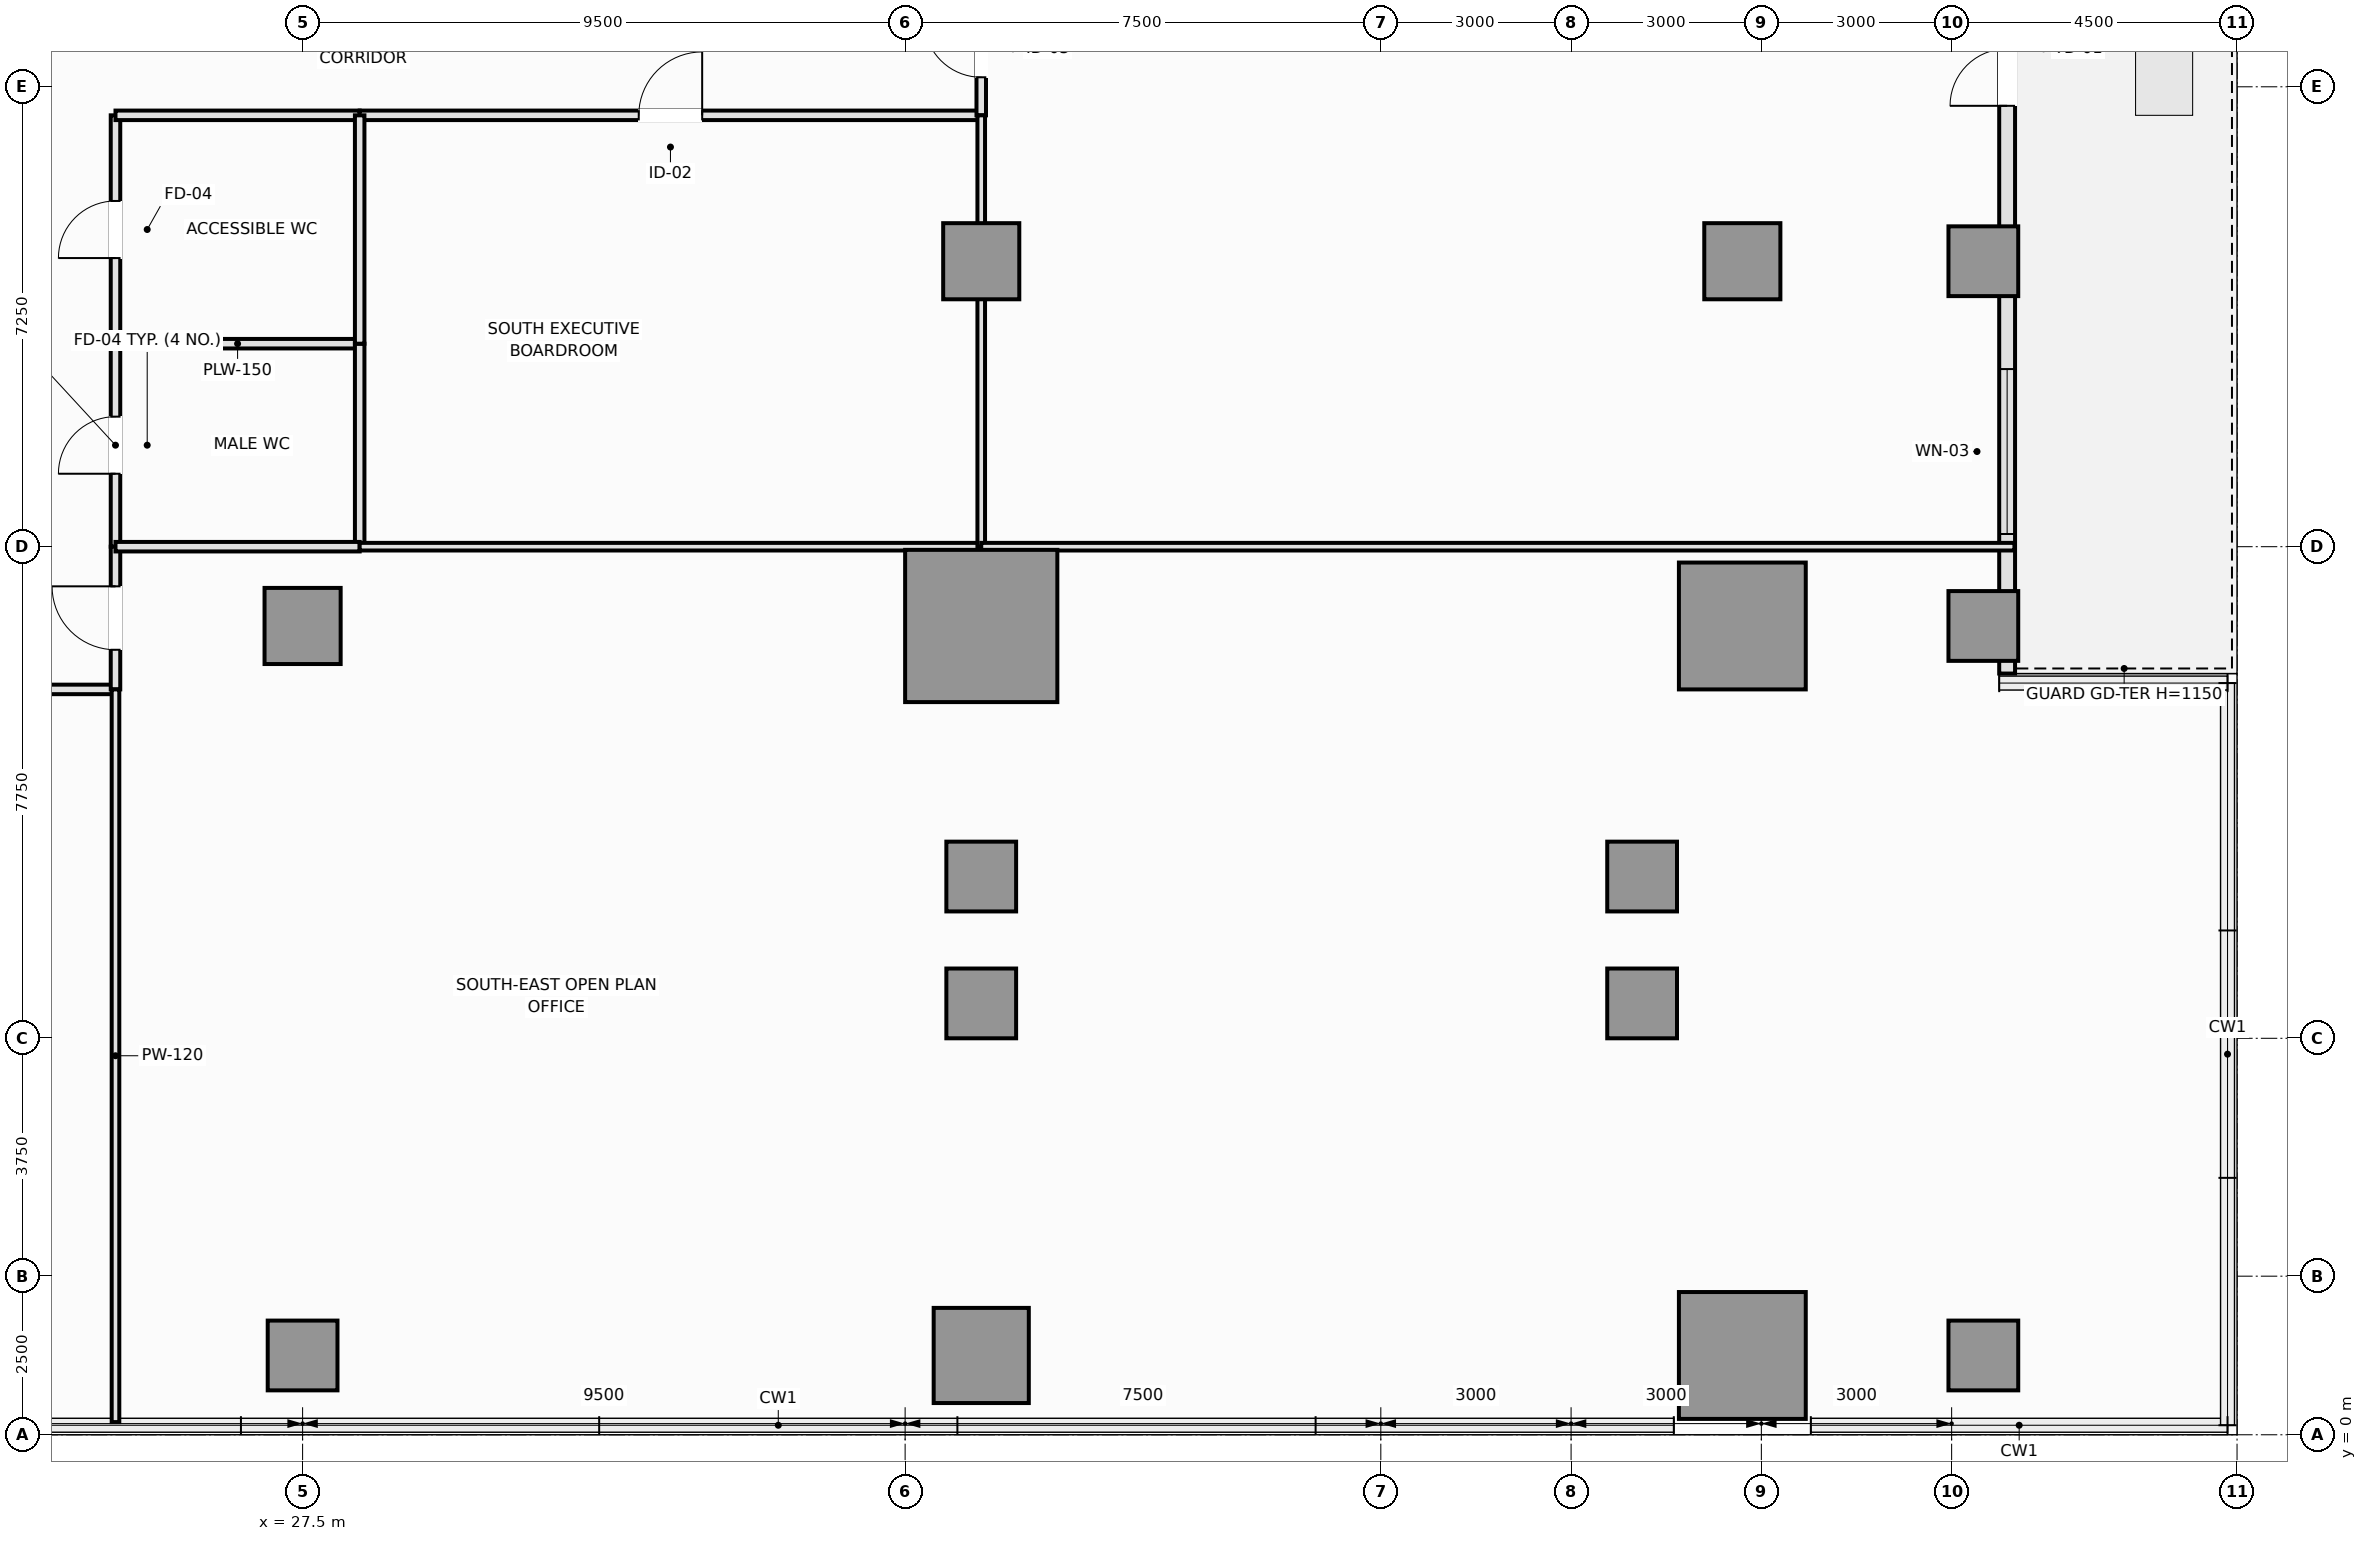
"""IFC4 building model, lengths in metres.
Left out: names, types, materials, properties, quantities, classifications, styles, units other than length and angle.
Written with IfcOpenShell. Run it as: python <this file> out.ifc"""

import sys

from ifc_helpers import new_model, si_unit, direction, frame, frame_2d, origin, origin_2d, place, context, subcontext, project, spatial, rectangle, extrude, element, fill, save


model = new_model("IFC4")
c1 = context("Model", 3, precision=1e-05, world=origin(), true_north=direction((0.0, 1.0)))
c2 = subcontext(c1, "Body", "Model", "MODEL_VIEW")
j1 = project(units=[si_unit("LENGTHUNIT", "METRE"), si_unit("PLANEANGLEUNIT", "RADIAN")], contexts=[c1])
p1 = place(None, origin())
s1 = spatial("IfcSite", under=j1, at=p1, CompositionType="ELEMENT")
p2 = place(p1, origin())
s2 = spatial("IfcBuilding", under=s1, at=p2, CompositionType="ELEMENT")
p3 = place(p2, frame((0.0, 0.0, 20.4)))
s3 = spatial("IfcBuildingStorey", under=s2, at=p3, CompositionType="ELEMENT", Elevation=20.4)
p4 = place(p3, frame((38.2, 12.75, 0.0), z_axis=(0.0, 0.0, 1.0), x_axis=(1.0, 0.0, 0.0)))
e1 = element("IfcColumn", 1, at=p4, inside=s3, PredefinedType="COLUMN", context=c2, shape_type="SweptSolid", body=[
    extrude(rectangle(XDim=2.4, YDim=2.4, at=origin_2d()), origin(), (0.0, 0.0, 1.0), 5.2),
])
for number, where, z_axis, x_axis in (
    (2, (27.5, 12.75, 0.0), (0.0, 0.0, 1.0), (1.0, 0.0, 0.0)),
    (3, (38.2, 18.5, 0.0), (0.0, 0.0, 1.0), (1.0, 0.0, 0.0)),
):
    element("IfcColumn", number, at=place(p3, frame(where, z_axis=z_axis, x_axis=x_axis)), inside=s3, PredefinedType="COLUMN", context=c2, shape_type="SweptSolid", body=[
        extrude(rectangle(XDim=1.2, YDim=1.2, at=origin_2d()), origin(), (0.0, 0.0, 1.0), 5.2),
    ])
for number, where, z_axis, x_axis in (
    (4, (50.2, 1.25, 0.0), (0.0, 0.0, 1.0), (1.0, 0.0, 0.0)),
    (5, (50.2, 12.75, 0.0), (0.0, 0.0, 1.0), (1.0, 0.0, 0.0)),
):
    element("IfcColumn", number, at=place(p3, frame(where, z_axis=z_axis, x_axis=x_axis)), inside=s3, PredefinedType="COLUMN", context=c2, shape_type="SweptSolid", body=[
        extrude(rectangle(XDim=2.0, YDim=2.0, at=origin_2d()), origin(), (0.0, 0.0, 1.0), 5.2),
    ])
p5 = place(p3, frame((50.2, 18.5, 0.0), z_axis=(0.0, 0.0, 1.0), x_axis=(1.0, 0.0, 0.0)))
e6 = element("IfcColumn", 6, at=p5, inside=s3, PredefinedType="COLUMN", context=c2, shape_type="SweptSolid", body=[
    extrude(rectangle(XDim=1.2, YDim=1.2, at=origin_2d()), origin(), (0.0, 0.0, 1.0), 5.2),
])
for number, where, z_axis, x_axis in (
    (7, (54.0, 1.25, 0.0), (0.0, 0.0, 1.0), (1.0, 0.0, 0.0)),
    (8, (54.0, 12.75, 0.0), (0.0, 0.0, 1.0), (1.0, 0.0, 0.0)),
    (9, (54.0, 18.5, 0.0), (0.0, 0.0, 1.0), (1.0, 0.0, 0.0)),
    (10, (48.62, 6.8, 0.0), (0.0, 0.0, 1.0), (1.0, 0.0, 0.0)),
    (11, (48.62, 8.8, 0.0), (0.0, 0.0, 1.0), (1.0, 0.0, 0.0)),
    (12, (38.2, 6.8, 0.0), (0.0, 0.0, 1.0), (1.0, 0.0, 0.0)),
    (13, (38.2, 8.8, 0.0), (0.0, 0.0, 1.0), (1.0, 0.0, 0.0)),
    (14, (27.5, 1.25, 0.0), (0.0, 0.0, 1.0), (1.0, 0.0, 0.0)),
):
    element("IfcColumn", number, at=place(p3, frame(where, z_axis=z_axis, x_axis=x_axis)), inside=s3, PredefinedType="COLUMN", context=c2, shape_type="SweptSolid", body=[
        extrude(rectangle(XDim=1.1, YDim=1.1, at=origin_2d()), origin(), (0.0, 0.0, 1.0), 5.2),
    ])
p6 = place(p3, frame((38.2, 1.25, 0.0), z_axis=(0.0, 0.0, 1.0), x_axis=(1.0, 0.0, 0.0)))
e15 = element("IfcColumn", 15, at=p6, inside=s3, PredefinedType="COLUMN", context=c2, shape_type="SweptSolid", body=[
    extrude(rectangle(XDim=1.5, YDim=1.5, at=origin_2d()), origin(), (0.0, 0.0, 1.0), 5.2),
])
p7 = place(p3, frame((54.375, 12.0, 0.0), z_axis=(0.0, 0.0, 1.0), x_axis=(0.0, 1.0, 0.0)))
e16 = element("IfcWall", 16, at=p7, inside=s3, PredefinedType="SOLIDWALL", context=c2, shape_type="SweptSolid", body=[
    extrude(rectangle(XDim=26.5, YDim=0.25, at=frame_2d((13.25, 0.0))), origin(), (0.0, 0.0, 1.0), 5.02),
])
p8 = place(p7, frame((8.95, 0.0, 0.0)))
e17 = element("IfcOpeningElement", 17, at=p8, cuts=e16, PredefinedType="OPENING", context=c2, shape_type="SweptSolid", body=[
    extrude(rectangle(XDim=1.8, YDim=2.2, at=frame_2d((0.9, 1.1))), frame((0.0, 0.135, 0.0), z_axis=(0.0, -1.0, 0.0), x_axis=(1.0, 0.0, 0.0)), (0.0, 0.0, 1.0), 0.27),
])
p9 = place(p7, frame((2.2, 0.0, 0.9)))
e18 = element("IfcOpeningElement", 18, at=p9, cuts=e16, PredefinedType="OPENING", context=c2, shape_type="SweptSolid", body=[
    extrude(rectangle(XDim=2.6, YDim=2.2, at=frame_2d((1.3, 1.1))), frame((0.0, 0.135, 0.0), z_axis=(0.0, -1.0, 0.0), x_axis=(1.0, 0.0, 0.0)), (0.0, 0.0, 1.0), 0.27),
])
p10 = place(p7, frame((21.8, 0.0, 0.9)))
e19 = element("IfcOpeningElement", 19, at=p10, cuts=e16, PredefinedType="OPENING", context=c2, shape_type="SweptSolid", body=[
    extrude(rectangle(XDim=2.6, YDim=2.2, at=frame_2d((1.3, 1.1))), frame((0.0, 0.135, 0.0), z_axis=(0.0, -1.0, 0.0), x_axis=(1.0, 0.0, 0.0)), (0.0, 0.0, 1.0), 0.27),
])
p11 = place(p3, frame((24.55, 14.0, 0.0), z_axis=(0.0, 0.0, 1.0), x_axis=(0.0, 1.0, 0.0)))
e20 = element("IfcWall", 20, at=p11, inside=s3, PredefinedType="PLUMBINGWALL", context=c2, shape_type="SweptSolid", body=[
    extrude(rectangle(XDim=3.2, YDim=0.15, at=frame_2d((1.6, 0.0))), origin(), (0.0, 0.0, 1.0), 5.02),
])
p12 = place(p11, frame((1.15, 0.0, 0.0)))
e21 = element("IfcOpeningElement", 21, at=p12, cuts=e20, PredefinedType="OPENING", context=c2, shape_type="SweptSolid", body=[
    extrude(rectangle(XDim=0.9, YDim=2.1, at=frame_2d((0.45, 1.05))), frame((0.0, 0.085, 0.0), z_axis=(0.0, -1.0, 0.0), x_axis=(1.0, 0.0, 0.0)), (0.0, 0.0, 1.0), 0.17),
])
p13 = place(p3, frame((24.55, 17.2, 0.0), z_axis=(0.0, 0.0, 1.0), x_axis=(0.0, 1.0, 0.0)))
e22 = element("IfcWall", 22, at=p13, inside=s3, PredefinedType="PLUMBINGWALL", context=c2, shape_type="SweptSolid", body=[
    extrude(rectangle(XDim=3.6, YDim=0.15, at=frame_2d((1.8, 0.0))), origin(), (0.0, 0.0, 1.0), 5.02),
])
p14 = place(p13, frame((1.35, 0.0, 0.0)))
e23 = element("IfcOpeningElement", 23, at=p14, cuts=e22, PredefinedType="OPENING", context=c2, shape_type="SweptSolid", body=[
    extrude(rectangle(XDim=0.9, YDim=2.1, at=frame_2d((0.45, 1.05))), frame((0.0, 0.085, 0.0), z_axis=(0.0, -1.0, 0.0), x_axis=(1.0, 0.0, 0.0)), (0.0, 0.0, 1.0), 0.17),
])
p15 = place(p3, frame((24.55, 20.8, 0.0), z_axis=(0.0, 0.0, 1.0), x_axis=(1.0, 0.0, 0.0)))
e24 = element("IfcWall", 24, at=p15, inside=s3, PredefinedType="PLUMBINGWALL", context=c2, shape_type="SweptSolid", body=[
    extrude(rectangle(XDim=3.85, YDim=0.15, at=frame_2d((1.925, 0.0))), origin(), (0.0, 0.0, 1.0), 5.02),
])
p16 = place(p3, frame((28.4, 20.8, 0.0), z_axis=(0.0, 0.0, 1.0), x_axis=(1.0, 0.0, 0.0)))
e25 = element("IfcWall", 25, at=p16, inside=s3, PredefinedType="PARTITIONING", context=c2, shape_type="SweptSolid", body=[
    extrude(rectangle(XDim=9.8, YDim=0.15, at=frame_2d((4.9, 0.0))), origin(), (0.0, 0.0, 1.0), 5.02),
])
p17 = place(p16, frame((4.4, 0.0, 0.0)))
e26 = element("IfcOpeningElement", 26, at=p17, cuts=e25, PredefinedType="OPENING", context=c2, shape_type="SweptSolid", body=[
    extrude(rectangle(XDim=1.0, YDim=2.15, at=frame_2d((0.5, 1.075))), frame((0.0, 0.085, 0.0), z_axis=(0.0, -1.0, 0.0), x_axis=(1.0, 0.0, 0.0)), (0.0, 0.0, 1.0), 0.17),
])
p18 = place(p3, frame((38.2, 20.8, 0.0), z_axis=(0.0, 0.0, 1.0), x_axis=(0.0, 1.0, 0.0)))
e27 = element("IfcWall", 27, at=p18, inside=s3, PredefinedType="PARTITIONING", context=c2, shape_type="SweptSolid", body=[
    extrude(rectangle(XDim=2.1, YDim=0.15, at=frame_2d((1.05, 0.0))), origin(), (0.0, 0.0, 1.0), 4.42),
])
p19 = place(p18, frame((0.6, 0.0, 0.0)))
e28 = element("IfcOpeningElement", 28, at=p19, cuts=e27, PredefinedType="OPENING", context=c2, shape_type="SweptSolid", body=[
    extrude(rectangle(XDim=0.9, YDim=2.1, at=frame_2d((0.45, 1.05))), frame((0.0, 0.085, 0.0), z_axis=(0.0, -1.0, 0.0), x_axis=(1.0, 0.0, 0.0)), (0.0, 0.0, 1.0), 0.17),
])
p20 = place(p3, frame((4.52, 11.75, 0.0), z_axis=(0.0, 0.0, 1.0), x_axis=(1.0, 0.0, 0.0)))
e29 = element("IfcWall", 29, at=p20, inside=s3, PredefinedType="PARTITIONING", context=c2, shape_type="SweptSolid", body=[
    extrude(rectangle(XDim=20.03, YDim=0.15, at=frame_2d((10.015, 0.0))), origin(), (0.0, 0.0, 1.0), 5.02),
])
p21 = place(p20, frame((9.115, 0.0, 0.0)))
e30 = element("IfcOpeningElement", 30, at=p21, cuts=e29, PredefinedType="OPENING", context=c2, shape_type="SweptSolid", body=[
    extrude(rectangle(XDim=1.8, YDim=2.2, at=frame_2d((0.9, 1.1))), frame((0.0, 0.085, 0.0), z_axis=(0.0, -1.0, 0.0), x_axis=(1.0, 0.0, 0.0)), (0.0, 0.0, 1.0), 0.17),
])
p22 = place(p3, frame((24.55, 11.75, 0.0), z_axis=(0.0, 0.0, 1.0), x_axis=(0.0, 1.0, 0.0)))
e31 = element("IfcWall", 31, at=p22, inside=s3, PredefinedType="PARTITIONING", context=c2, shape_type="SweptSolid", body=[
    extrude(rectangle(XDim=2.25, YDim=0.15, at=frame_2d((1.125, 0.0))), origin(), (0.0, 0.0, 1.0), 5.02),
])
p23 = place(p22, frame((0.625, 0.0, 0.0)))
e32 = element("IfcOpeningElement", 32, at=p23, cuts=e31, PredefinedType="OPENING", context=c2, shape_type="SweptSolid", body=[
    extrude(rectangle(XDim=1.0, YDim=2.15, at=frame_2d((0.5, 1.075))), frame((0.0, 0.085, 0.0), z_axis=(0.0, -1.0, 0.0), x_axis=(1.0, 0.0, 0.0)), (0.0, 0.0, 1.0), 0.17),
])
p24 = place(p3, frame((24.55, 0.2, 0.0), z_axis=(0.0, 0.0, 1.0), x_axis=(0.0, 1.0, 0.0)))
e33 = element("IfcWall", 33, at=p24, inside=s3, PredefinedType="PARTITIONING", context=c2, shape_type="SweptSolid", body=[
    extrude(rectangle(XDim=11.55, YDim=0.12, at=frame_2d((5.775, 0.0))), origin(), (0.0, 0.0, 1.0), 5.02),
])
p25 = place(p3, frame((24.55, 17.2, 0.0), z_axis=(0.0, 0.0, 1.0), x_axis=(1.0, 0.0, 0.0)))
e34 = element("IfcWall", 34, at=p25, inside=s3, PredefinedType="PLUMBINGWALL", context=c2, shape_type="SweptSolid", body=[
    extrude(rectangle(XDim=3.85, YDim=0.15, at=frame_2d((1.925, 0.0))), origin(), (0.0, 0.0, 1.0), 5.02),
])
p26 = place(p3, frame((28.4, 14.0, 0.0), z_axis=(0.0, 0.0, 1.0), x_axis=(0.0, 1.0, 0.0)))
e35 = element("IfcWall", 35, at=p26, inside=s3, PredefinedType="PLUMBINGWALL", context=c2, shape_type="SweptSolid", body=[
    extrude(rectangle(XDim=3.2, YDim=0.15, at=frame_2d((1.6, 0.0))), origin(), (0.0, 0.0, 1.0), 5.02),
])
p27 = place(p3, frame((24.55, 14.0, 0.0), z_axis=(0.0, 0.0, 1.0), x_axis=(1.0, 0.0, 0.0)))
e36 = element("IfcWall", 36, at=p27, inside=s3, PredefinedType="PLUMBINGWALL", context=c2, shape_type="SweptSolid", body=[
    extrude(rectangle(XDim=3.85, YDim=0.15, at=frame_2d((1.925, 0.0))), origin(), (0.0, 0.0, 1.0), 5.02),
])
p28 = place(p3, frame((28.4, 17.2, 0.0), z_axis=(0.0, 0.0, 1.0), x_axis=(0.0, 1.0, 0.0)))
e37 = element("IfcWall", 37, at=p28, inside=s3, PredefinedType="PLUMBINGWALL", context=c2, shape_type="SweptSolid", body=[
    extrude(rectangle(XDim=3.6, YDim=0.15, at=frame_2d((1.8, 0.0))), origin(), (0.0, 0.0, 1.0), 5.02),
])
p29 = place(p3, frame((28.4, 14.0, 0.0), z_axis=(0.0, 0.0, 1.0), x_axis=(1.0, 0.0, 0.0)))
e38 = element("IfcWall", 38, at=p29, inside=s3, PredefinedType="PARTITIONING", context=c2, shape_type="SweptSolid", body=[
    extrude(rectangle(XDim=9.8, YDim=0.12, at=frame_2d((4.9, 0.0))), origin(), (0.0, 0.0, 1.0), 5.02),
])
p30 = place(p3, frame((38.2, 14.0, 0.0), z_axis=(0.0, 0.0, 1.0), x_axis=(0.0, 1.0, 0.0)))
e39 = element("IfcWall", 39, at=p30, inside=s3, PredefinedType="PARTITIONING", context=c2, shape_type="SweptSolid", body=[
    extrude(rectangle(XDim=6.8, YDim=0.12, at=frame_2d((3.4, 0.0))), origin(), (0.0, 0.0, 1.0), 4.42),
])
p31 = place(p3, frame((38.2, 14.0, 0.0), z_axis=(0.0, 0.0, 1.0), x_axis=(1.0, 0.0, 0.0)))
e40 = element("IfcWall", 40, at=p31, inside=s3, PredefinedType="PARTITIONING", context=c2, shape_type="SweptSolid", body=[
    extrude(rectangle(XDim=16.29, YDim=0.12, at=frame_2d((8.145, 0.0))), origin(), (0.0, 0.0, 1.0), 5.02),
])
p32 = place(p8, frame((1.8, 0.0, 0.0), z_axis=(0.0, 0.0, 1.0), x_axis=(-1.0, 0.0, 0.0)))
e41 = element("IfcDoor", 41, at=p32, inside=s3, OperationType="DOUBLE_DOOR_SINGLE_SWING", PredefinedType="DOOR", context=c2, shape_type="SweptSolid", body=[
    extrude(rectangle(XDim=1.8, YDim=2.2, at=frame_2d((0.9, 1.1))), frame((0.0, 0.025, 0.0), z_axis=(0.0, -1.0, 0.0), x_axis=(1.0, 0.0, 0.0)), (0.0, 0.0, 1.0), 0.05),
])
fill(e17, e41)
p33 = place(p9, origin())
e42 = element("IfcWindow", 42, at=p33, inside=s3, PartitioningType="SINGLE_PANEL", PredefinedType="WINDOW", context=c2, shape_type="SweptSolid", body=[
    extrude(rectangle(XDim=2.6, YDim=2.2, at=frame_2d((1.3, 1.1))), frame((0.0, 0.03, 0.0), z_axis=(0.0, -1.0, 0.0), x_axis=(1.0, 0.0, 0.0)), (0.0, 0.0, 1.0), 0.06),
])
fill(e18, e42)
p34 = place(p12, origin())
e43 = element("IfcDoor", 43, at=p34, inside=s3, OperationType="SINGLE_SWING_LEFT", PredefinedType="DOOR", context=c2, shape_type="SweptSolid", body=[
    extrude(rectangle(XDim=0.9, YDim=2.1, at=frame_2d((0.45, 1.05))), frame((0.0, 0.025, 0.0), z_axis=(0.0, -1.0, 0.0), x_axis=(1.0, 0.0, 0.0)), (0.0, 0.0, 1.0), 0.05),
])
fill(e21, e43)
p35 = place(p14, origin())
e44 = element("IfcDoor", 44, at=p35, inside=s3, OperationType="SINGLE_SWING_LEFT", PredefinedType="DOOR", context=c2, shape_type="SweptSolid", body=[
    extrude(rectangle(XDim=0.9, YDim=2.1, at=frame_2d((0.45, 1.05))), frame((0.0, 0.025, 0.0), z_axis=(0.0, -1.0, 0.0), x_axis=(1.0, 0.0, 0.0)), (0.0, 0.0, 1.0), 0.05),
])
fill(e23, e44)
p36 = place(p17, origin())
e45 = element("IfcDoor", 45, at=p36, inside=s3, OperationType="SINGLE_SWING_RIGHT", PredefinedType="DOOR", context=c2, shape_type="SweptSolid", body=[
    extrude(rectangle(XDim=1.0, YDim=2.15, at=frame_2d((0.5, 1.075))), frame((0.0, 0.025, 0.0), z_axis=(0.0, -1.0, 0.0), x_axis=(1.0, 0.0, 0.0)), (0.0, 0.0, 1.0), 0.05),
])
fill(e26, e45)
p37 = place(p19, origin())
e46 = element("IfcDoor", 46, at=p37, inside=s3, OperationType="SINGLE_SWING_RIGHT", PredefinedType="DOOR", context=c2, shape_type="SweptSolid", body=[
    extrude(rectangle(XDim=0.9, YDim=2.1, at=frame_2d((0.45, 1.05))), frame((0.0, 0.025, 0.0), z_axis=(0.0, -1.0, 0.0), x_axis=(1.0, 0.0, 0.0)), (0.0, 0.0, 1.0), 0.05),
])
fill(e28, e46)
p38 = place(p23, origin())
e47 = element("IfcDoor", 47, at=p38, inside=s3, OperationType="SINGLE_SWING_RIGHT", PredefinedType="DOOR", context=c2, shape_type="SweptSolid", body=[
    extrude(rectangle(XDim=1.0, YDim=2.15, at=frame_2d((0.5, 1.075))), frame((0.0, 0.025, 0.0), z_axis=(0.0, -1.0, 0.0), x_axis=(1.0, 0.0, 0.0)), (0.0, 0.0, 1.0), 0.05),
])
fill(e32, e47)
save(model, sys.argv[1])
